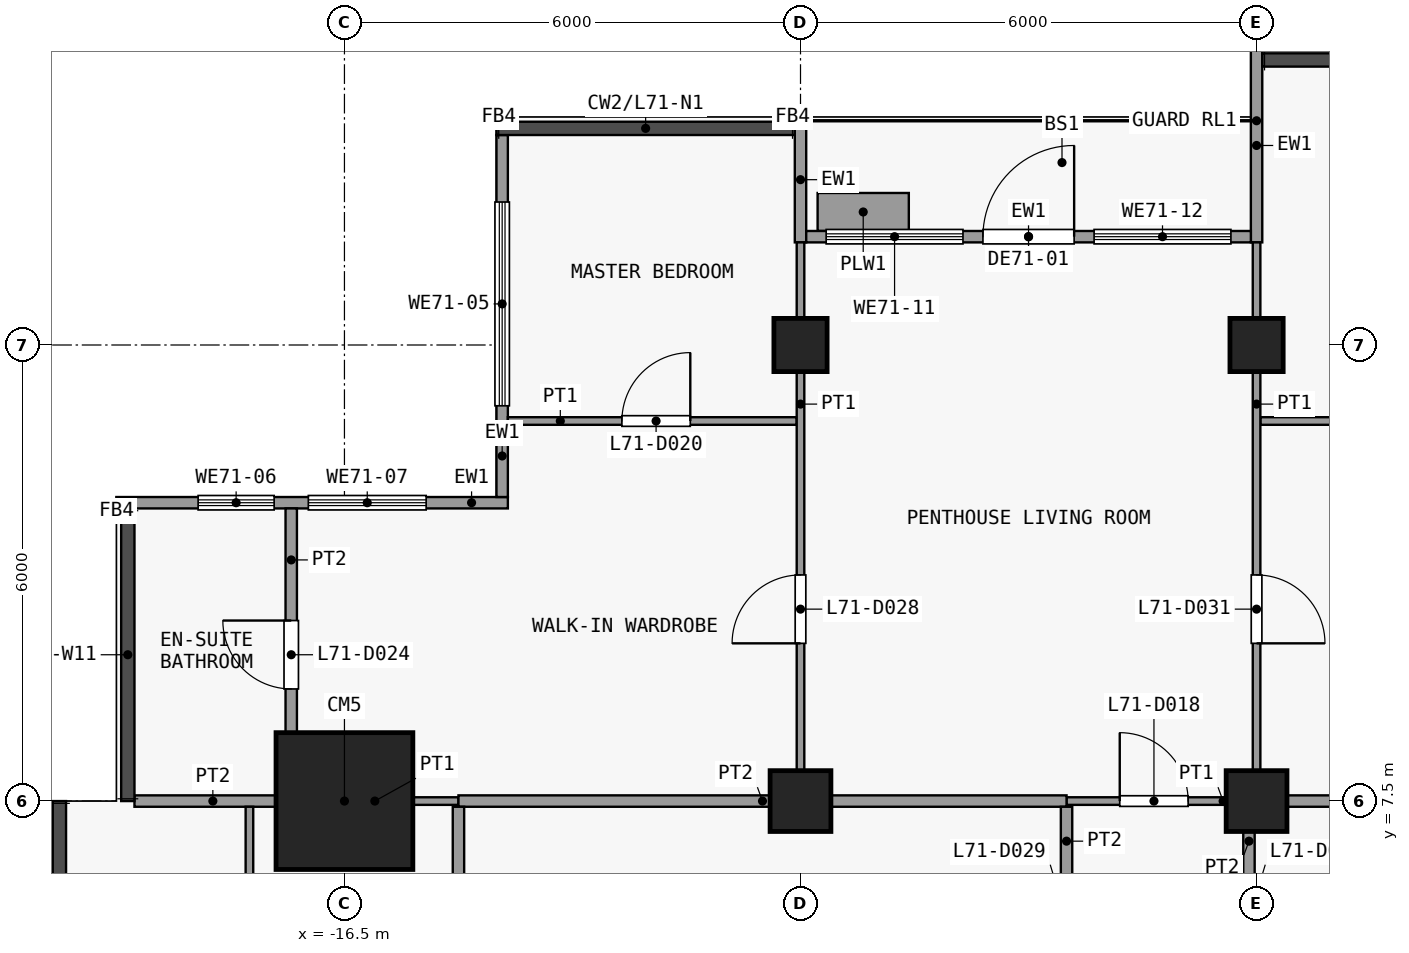
"""IFC4 building model, lengths in metres.
Left out: names, types, materials, properties, quantities, classifications, styles, units other than length and angle.
Written with IfcOpenShell. Run it as: python <this file> out.ifc"""

import sys

from ifc_helpers import new_model, si_unit, direction, frame, frame_2d, origin, origin_2d, place, context, subcontext, project, spatial, rectangle, extrude, element, fill, save


model = new_model("IFC4")
c1 = context("Model", 3, precision=1e-05, world=origin(), true_north=direction((0.0, 1.0)))
c2 = subcontext(c1, "Body", "Model", "MODEL_VIEW")
j1 = project(units=[si_unit("LENGTHUNIT", "METRE"), si_unit("PLANEANGLEUNIT", "RADIAN")], contexts=[c1])
p1 = place(None, origin())
s1 = spatial("IfcSite", under=j1, at=p1, CompositionType="ELEMENT")
p2 = place(p1, origin())
s2 = spatial("IfcBuilding", under=s1, at=p2, CompositionType="ELEMENT")
p3 = place(p2, frame((0.0, 0.0, 280.7)))
s3 = spatial("IfcBuildingStorey", under=s2, at=p3, CompositionType="ELEMENT", Elevation=280.7)
p4 = place(p3, frame((-16.5, 7.5, 0.0), z_axis=(0.0, 0.0, 1.0), x_axis=(1.0, 0.0, 0.0)))
e1 = element("IfcColumn", 1, at=p4, inside=s3, PredefinedType="COLUMN", context=c2, shape_type="SweptSolid", body=[
    extrude(rectangle(XDim=1.8, YDim=1.8, at=origin_2d()), origin(), (0.0, 0.0, 1.0), 3.6),
])
p5 = place(p3, frame((-10.5, 7.5, 0.0), z_axis=(0.0, 0.0, 1.0), x_axis=(1.0, 0.0, 0.0)))
e2 = element("IfcColumn", 2, at=p5, inside=s3, PredefinedType="COLUMN", context=c2, shape_type="SweptSolid", body=[
    extrude(rectangle(XDim=0.8, YDim=0.8, at=origin_2d()), origin(), (0.0, 0.0, 1.0), 3.6),
])
p6 = place(p3, frame((-10.5, 13.5, 0.0), z_axis=(0.0, 0.0, 1.0), x_axis=(1.0, 0.0, 0.0)))
e3 = element("IfcColumn", 3, at=p6, inside=s3, PredefinedType="COLUMN", context=c2, shape_type="SweptSolid", body=[
    extrude(rectangle(XDim=0.7, YDim=0.7, at=origin_2d()), origin(), (0.0, 0.0, 1.0), 3.6),
])
p7 = place(p3, frame((-4.5, 7.5, 0.0), z_axis=(0.0, 0.0, 1.0), x_axis=(1.0, 0.0, 0.0)))
e4 = element("IfcColumn", 4, at=p7, inside=s3, PredefinedType="COLUMN", context=c2, shape_type="SweptSolid", body=[
    extrude(rectangle(XDim=0.8, YDim=0.8, at=origin_2d()), origin(), (0.0, 0.0, 1.0), 3.6),
])
p8 = place(p3, frame((-4.5, 13.5, 0.0), z_axis=(0.0, 0.0, 1.0), x_axis=(1.0, 0.0, 0.0)))
e5 = element("IfcColumn", 5, at=p8, inside=s3, PredefinedType="COLUMN", context=c2, shape_type="SweptSolid", body=[
    extrude(rectangle(XDim=0.7, YDim=0.7, at=origin_2d()), origin(), (0.0, 0.0, 1.0), 3.6),
])
p9 = place(p3, frame((-14.425, 11.5, 0.0), z_axis=(0.0, 0.0, 1.0), x_axis=(0.0, 1.0, 0.0)))
e6 = element("IfcWall", 6, at=p9, inside=s3, PredefinedType="SOLIDWALL", context=c2, shape_type="SweptSolid", body=[
    extrude(rectangle(XDim=4.762, YDim=0.15, at=frame_2d((2.381, 0.0))), origin(), (0.0, 0.0, 1.0), 3.3),
])
p10 = place(p9, frame((1.2, 0.0, 0.9)))
e7 = element("IfcOpeningElement", 7, at=p10, cuts=e6, PredefinedType="OPENING", context=c2, shape_type="SweptSolid", body=[
    extrude(rectangle(XDim=2.681, YDim=2.4, at=frame_2d((1.34, 1.2))), frame((0.0, 0.085, 0.0), z_axis=(0.0, -1.0, 0.0), x_axis=(1.0, 0.0, 0.0)), (0.0, 0.0, 1.0), 0.17),
])
p11 = place(p3, frame((-19.5, 11.425, 0.0), z_axis=(0.0, 0.0, 1.0), x_axis=(1.0, 0.0, 0.0)))
e8 = element("IfcWall", 8, at=p11, inside=s3, PredefinedType="SOLIDWALL", context=c2, shape_type="SweptSolid", body=[
    extrude(rectangle(XDim=5.15, YDim=0.15, at=frame_2d((2.575, 0.0))), origin(), (0.0, 0.0, 1.0), 3.3),
])
p12 = place(p11, frame((1.075, 0.0, 0.9)))
e9 = element("IfcOpeningElement", 9, at=p12, cuts=e8, PredefinedType="OPENING", context=c2, shape_type="SweptSolid", body=[
    extrude(rectangle(XDim=1.0, YDim=2.4, at=frame_2d((0.5, 1.2))), frame((0.0, 0.085, 0.0), z_axis=(0.0, -1.0, 0.0), x_axis=(1.0, 0.0, 0.0)), (0.0, 0.0, 1.0), 0.17),
])
p13 = place(p11, frame((2.525, 0.0, 0.9)))
e10 = element("IfcOpeningElement", 10, at=p13, cuts=e8, PredefinedType="OPENING", context=c2, shape_type="SweptSolid", body=[
    extrude(rectangle(XDim=1.55, YDim=2.4, at=frame_2d((0.775, 1.2))), frame((0.0, 0.085, 0.0), z_axis=(0.0, -1.0, 0.0), x_axis=(1.0, 0.0, 0.0)), (0.0, 0.0, 1.0), 0.17),
])
p14 = place(p3, frame((-10.5, 14.85, 0.0), z_axis=(0.0, 0.0, 1.0), x_axis=(0.0, 1.0, 0.0)))
e11 = element("IfcWall", 11, at=p14, inside=s3, PredefinedType="SOLIDWALL", context=c2, shape_type="SweptSolid", body=[
    extrude(rectangle(XDim=1.65, YDim=0.15, at=frame_2d((0.825, 0.0))), origin(), (0.0, 0.0, 1.0), 3.3),
])
p15 = place(p3, frame((-4.5, 14.85, 0.0), z_axis=(0.0, 0.0, 1.0), x_axis=(0.0, 1.0, 0.0)))
e12 = element("IfcWall", 12, at=p15, inside=s3, PredefinedType="SOLIDWALL", context=c2, shape_type="SweptSolid", body=[
    extrude(rectangle(XDim=2.55, YDim=0.15, at=frame_2d((1.275, 0.0))), origin(), (0.0, 0.0, 1.0), 3.3),
])
p16 = place(p3, frame((-10.425, 14.925, 0.0), z_axis=(0.0, 0.0, 1.0), x_axis=(1.0, 0.0, 0.0)))
e13 = element("IfcWall", 13, at=p16, inside=s3, PredefinedType="SOLIDWALL", context=c2, shape_type="SweptSolid", body=[
    extrude(rectangle(XDim=5.85, YDim=0.15, at=frame_2d((2.925, 0.0))), origin(), (0.0, 0.0, 1.0), 3.3),
])
p17 = place(p16, frame((2.325, 0.0, 0.0)))
e14 = element("IfcOpeningElement", 14, at=p17, cuts=e13, PredefinedType="OPENING", context=c2, shape_type="SweptSolid", body=[
    extrude(rectangle(XDim=1.2, YDim=2.4, at=frame_2d((0.6, 1.2))), frame((0.0, 0.085, 0.0), z_axis=(0.0, -1.0, 0.0), x_axis=(1.0, 0.0, 0.0)), (0.0, 0.0, 1.0), 0.17),
])
p18 = place(p16, frame((0.262, 0.0, 0.9)))
e15 = element("IfcOpeningElement", 15, at=p18, cuts=e13, PredefinedType="OPENING", context=c2, shape_type="SweptSolid", body=[
    extrude(rectangle(XDim=1.8, YDim=2.1, at=frame_2d((0.9, 1.05))), frame((0.0, 0.085, 0.0), z_axis=(0.0, -1.0, 0.0), x_axis=(1.0, 0.0, 0.0)), (0.0, 0.0, 1.0), 0.17),
])
p19 = place(p16, frame((3.788, 0.0, 0.9)))
e16 = element("IfcOpeningElement", 16, at=p19, cuts=e13, PredefinedType="OPENING", context=c2, shape_type="SweptSolid", body=[
    extrude(rectangle(XDim=1.8, YDim=2.1, at=frame_2d((0.9, 1.05))), frame((0.0, 0.085, 0.0), z_axis=(0.0, -1.0, 0.0), x_axis=(1.0, 0.0, 0.0)), (0.0, 0.0, 1.0), 0.17),
])
p20 = place(p3, frame((-10.275, 15.25, 0.0), z_axis=(0.0, 0.0, 1.0), x_axis=(1.0, 0.0, 0.0)))
e17 = element("IfcWall", 17, at=p20, inside=s3, PredefinedType="USERDEFINED", context=c2, shape_type="SweptSolid", body=[
    extrude(rectangle(XDim=1.2, YDim=0.5, at=frame_2d((0.6, 0.0))), origin(), (0.0, 0.0, 1.0), 0.9),
])
p21 = place(p3, frame((-17.2, 7.5, 0.0), z_axis=(0.0, 0.0, 1.0), x_axis=(1.0, 0.0, 0.0)))
e18 = element("IfcWall", 18, at=p21, inside=s3, PredefinedType="PARTITIONING", context=c2, shape_type="SweptSolid", body=[
    extrude(rectangle(XDim=2.2, YDim=0.1, at=frame_2d((1.1, 0.0))), origin(), (0.0, 0.0, 1.0), 3.3),
])
p22 = place(p3, frame((-7.0, 7.5, 0.0), z_axis=(0.0, 0.0, 1.0), x_axis=(1.0, 0.0, 0.0)))
e19 = element("IfcWall", 19, at=p22, inside=s3, PredefinedType="PARTITIONING", context=c2, shape_type="SweptSolid", body=[
    extrude(rectangle(XDim=2.4, YDim=0.1, at=frame_2d((1.2, 0.0))), origin(), (0.0, 0.0, 1.0), 3.3),
])
p23 = place(p22, frame((0.7, 0.0, 0.0)))
e20 = element("IfcOpeningElement", 20, at=p23, cuts=e19, PredefinedType="OPENING", context=c2, shape_type="SweptSolid", body=[
    extrude(rectangle(XDim=0.9, YDim=2.1, at=frame_2d((0.45, 1.05))), frame((0.0, 0.06, 0.0), z_axis=(0.0, -1.0, 0.0), x_axis=(1.0, 0.0, 0.0)), (0.0, 0.0, 1.0), 0.12),
])
p24 = place(p3, frame((-19.262, 7.5, 0.0), z_axis=(0.0, 0.0, 1.0), x_axis=(1.0, 0.0, 0.0)))
e21 = element("IfcWall", 21, at=p24, inside=s3, PredefinedType="PARTITIONING", context=c2, shape_type="SweptSolid", body=[
    extrude(rectangle(XDim=2.062, YDim=0.15, at=frame_2d((1.031, 0.0))), origin(), (0.0, 0.0, 1.0), 3.3),
])
p25 = place(p3, frame((-15.0, 7.5, 0.0), z_axis=(0.0, 0.0, 1.0), x_axis=(1.0, 0.0, 0.0)))
e22 = element("IfcWall", 22, at=p25, inside=s3, PredefinedType="PARTITIONING", context=c2, shape_type="SweptSolid", body=[
    extrude(rectangle(XDim=8.0, YDim=0.15, at=frame_2d((4.0, 0.0))), origin(), (0.0, 0.0, 1.0), 3.3),
])
p26 = place(p3, frame((-4.5, 7.5, 0.0), z_axis=(0.0, 0.0, 1.0), x_axis=(1.0, 0.0, 0.0)))
e23 = element("IfcWall", 23, at=p26, inside=s3, PredefinedType="PARTITIONING", context=c2, shape_type="SweptSolid", body=[
    extrude(rectangle(XDim=11.5, YDim=0.15, at=frame_2d((5.75, 0.0))), origin(), (0.0, 0.0, 1.0), 3.3),
])
p27 = place(p3, frame((-14.35, 12.5, 0.0), z_axis=(0.0, 0.0, 1.0), x_axis=(1.0, 0.0, 0.0)))
e24 = element("IfcWall", 24, at=p27, inside=s3, PredefinedType="PARTITIONING", context=c2, shape_type="SweptSolid", body=[
    extrude(rectangle(XDim=3.8, YDim=0.1, at=frame_2d((1.9, 0.0))), origin(), (0.0, 0.0, 1.0), 3.3),
])
p28 = place(p27, frame((1.5, 0.0, 0.0)))
e25 = element("IfcOpeningElement", 25, at=p28, cuts=e24, PredefinedType="OPENING", context=c2, shape_type="SweptSolid", body=[
    extrude(rectangle(XDim=0.9, YDim=2.1, at=frame_2d((0.45, 1.05))), frame((0.0, 0.06, 0.0), z_axis=(0.0, -1.0, 0.0), x_axis=(1.0, 0.0, 0.0)), (0.0, 0.0, 1.0), 0.12),
])
p29 = place(p3, frame((-4.45, 12.5, 0.0), z_axis=(0.0, 0.0, 1.0), x_axis=(1.0, 0.0, 0.0)))
e26 = element("IfcWall", 26, at=p29, inside=s3, PredefinedType="PARTITIONING", context=c2, shape_type="SweptSolid", body=[
    extrude(rectangle(XDim=8.85, YDim=0.1, at=frame_2d((4.425, 0.0))), origin(), (0.0, 0.0, 1.0), 3.3),
])
p30 = place(p29, frame((4.0, 0.0, 0.0)))
e27 = element("IfcOpeningElement", 27, at=p30, cuts=e26, PredefinedType="OPENING", context=c2, shape_type="SweptSolid", body=[
    extrude(rectangle(XDim=0.9, YDim=2.1, at=frame_2d((0.45, 1.05))), frame((0.0, 0.06, 0.0), z_axis=(0.0, -1.0, 0.0), x_axis=(1.0, 0.0, 0.0)), (0.0, 0.0, 1.0), 0.12),
])
p31 = place(p3, frame((-17.75, 4.6, 0.0), z_axis=(0.0, 0.0, 1.0), x_axis=(0.0, 1.0, 0.0)))
e28 = element("IfcWall", 28, at=p31, inside=s3, PredefinedType="PARTITIONING", context=c2, shape_type="SweptSolid", body=[
    extrude(rectangle(XDim=2.825, YDim=0.1, at=frame_2d((1.413, 0.0))), origin(), (0.0, 0.0, 1.0), 3.3),
])
p32 = place(p31, frame((1.0, 0.0, 0.0)))
e29 = element("IfcOpeningElement", 29, at=p32, cuts=e28, PredefinedType="OPENING", context=c2, shape_type="SweptSolid", body=[
    extrude(rectangle(XDim=0.9, YDim=2.1, at=frame_2d((0.45, 1.05))), frame((0.0, 0.06, 0.0), z_axis=(0.0, -1.0, 0.0), x_axis=(1.0, 0.0, 0.0)), (0.0, 0.0, 1.0), 0.12),
])
p33 = place(p3, frame((-17.2, 7.575, 0.0), z_axis=(0.0, 0.0, 1.0), x_axis=(0.0, 1.0, 0.0)))
e30 = element("IfcWall", 30, at=p33, inside=s3, PredefinedType="PARTITIONING", context=c2, shape_type="SweptSolid", body=[
    extrude(rectangle(XDim=3.775, YDim=0.15, at=frame_2d((1.888, 0.0))), origin(), (0.0, 0.0, 1.0), 3.3),
])
p34 = place(p33, frame((1.4, 0.0, 0.0)))
e31 = element("IfcOpeningElement", 31, at=p34, cuts=e30, PredefinedType="OPENING", context=c2, shape_type="SweptSolid", body=[
    extrude(rectangle(XDim=0.9, YDim=2.1, at=frame_2d((0.45, 1.05))), frame((0.0, 0.085, 0.0), z_axis=(0.0, -1.0, 0.0), x_axis=(1.0, 0.0, 0.0)), (0.0, 0.0, 1.0), 0.17),
])
p35 = place(p3, frame((-15.0, 4.6, 0.0), z_axis=(0.0, 0.0, 1.0), x_axis=(0.0, 1.0, 0.0)))
e32 = element("IfcWall", 32, at=p35, inside=s3, PredefinedType="PARTITIONING", context=c2, shape_type="SweptSolid", body=[
    extrude(rectangle(XDim=2.825, YDim=0.15, at=frame_2d((1.413, 0.0))), origin(), (0.0, 0.0, 1.0), 3.3),
])
p36 = place(p35, frame((1.0, 0.0, 0.0)))
e33 = element("IfcOpeningElement", 33, at=p36, cuts=e32, PredefinedType="OPENING", context=c2, shape_type="SweptSolid", body=[
    extrude(rectangle(XDim=0.9, YDim=2.1, at=frame_2d((0.45, 1.05))), frame((0.0, 0.085, 0.0), z_axis=(0.0, -1.0, 0.0), x_axis=(1.0, 0.0, 0.0)), (0.0, 0.0, 1.0), 0.17),
])
p37 = place(p3, frame((-10.5, 7.575, 0.0), z_axis=(0.0, 0.0, 1.0), x_axis=(0.0, 1.0, 0.0)))
e34 = element("IfcWall", 34, at=p37, inside=s3, PredefinedType="PARTITIONING", context=c2, shape_type="SweptSolid", body=[
    extrude(rectangle(XDim=7.275, YDim=0.1, at=frame_2d((3.638, 0.0))), origin(), (0.0, 0.0, 1.0), 3.3),
])
p38 = place(p37, frame((2.0, 0.0, 0.0)))
e35 = element("IfcOpeningElement", 35, at=p38, cuts=e34, PredefinedType="OPENING", context=c2, shape_type="SweptSolid", body=[
    extrude(rectangle(XDim=0.9, YDim=2.1, at=frame_2d((0.45, 1.05))), frame((0.0, 0.06, 0.0), z_axis=(0.0, -1.0, 0.0), x_axis=(1.0, 0.0, 0.0)), (0.0, 0.0, 1.0), 0.12),
])
p39 = place(p3, frame((-7.0, 4.6, 0.0), z_axis=(0.0, 0.0, 1.0), x_axis=(0.0, 1.0, 0.0)))
e36 = element("IfcWall", 36, at=p39, inside=s3, PredefinedType="PARTITIONING", context=c2, shape_type="SweptSolid", body=[
    extrude(rectangle(XDim=2.825, YDim=0.15, at=frame_2d((1.413, 0.0))), origin(), (0.0, 0.0, 1.0), 3.3),
])
p40 = place(p39, frame((0.9, 0.0, 0.0)))
e37 = element("IfcOpeningElement", 37, at=p40, cuts=e36, PredefinedType="OPENING", context=c2, shape_type="SweptSolid", body=[
    extrude(rectangle(XDim=0.9, YDim=2.1, at=frame_2d((0.45, 1.05))), frame((0.0, 0.085, 0.0), z_axis=(0.0, -1.0, 0.0), x_axis=(1.0, 0.0, 0.0)), (0.0, 0.0, 1.0), 0.17),
])
p41 = place(p3, frame((-4.6, 4.6, 0.0), z_axis=(0.0, 0.0, 1.0), x_axis=(0.0, 1.0, 0.0)))
e38 = element("IfcWall", 38, at=p41, inside=s3, PredefinedType="PARTITIONING", context=c2, shape_type="SweptSolid", body=[
    extrude(rectangle(XDim=2.825, YDim=0.15, at=frame_2d((1.413, 0.0))), origin(), (0.0, 0.0, 1.0), 3.3),
])
p42 = place(p41, frame((0.9, 0.0, 0.0)))
e39 = element("IfcOpeningElement", 39, at=p42, cuts=e38, PredefinedType="OPENING", context=c2, shape_type="SweptSolid", body=[
    extrude(rectangle(XDim=0.9, YDim=2.1, at=frame_2d((0.45, 1.05))), frame((0.0, 0.085, 0.0), z_axis=(0.0, -1.0, 0.0), x_axis=(1.0, 0.0, 0.0)), (0.0, 0.0, 1.0), 0.17),
])
p43 = place(p3, frame((-4.5, 7.575, 0.0), z_axis=(0.0, 0.0, 1.0), x_axis=(0.0, 1.0, 0.0)))
e40 = element("IfcWall", 40, at=p43, inside=s3, PredefinedType="PARTITIONING", context=c2, shape_type="SweptSolid", body=[
    extrude(rectangle(XDim=7.275, YDim=0.1, at=frame_2d((3.638, 0.0))), origin(), (0.0, 0.0, 1.0), 3.3),
])
p44 = place(p43, frame((2.0, 0.0, 0.0)))
e41 = element("IfcOpeningElement", 41, at=p44, cuts=e40, PredefinedType="OPENING", context=c2, shape_type="SweptSolid", body=[
    extrude(rectangle(XDim=0.9, YDim=2.1, at=frame_2d((0.45, 1.05))), frame((0.0, 0.06, 0.0), z_axis=(0.0, -1.0, 0.0), x_axis=(1.0, 0.0, 0.0)), (0.0, 0.0, 1.0), 0.12),
])
p45 = place(p10, origin())
e42 = element("IfcWindow", 42, at=p45, inside=s3, PartitioningType="SINGLE_PANEL", PredefinedType="WINDOW", context=c2, shape_type="SweptSolid", body=[
    extrude(rectangle(XDim=2.681, YDim=2.4, at=frame_2d((1.34, 1.2))), frame((0.0, 0.03, 0.0), z_axis=(0.0, -1.0, 0.0), x_axis=(1.0, 0.0, 0.0)), (0.0, 0.0, 1.0), 0.06),
])
fill(e7, e42)
p46 = place(p12, origin())
e43 = element("IfcWindow", 43, at=p46, inside=s3, PartitioningType="SINGLE_PANEL", PredefinedType="WINDOW", context=c2, shape_type="SweptSolid", body=[
    extrude(rectangle(XDim=1.0, YDim=2.4, at=frame_2d((0.5, 1.2))), frame((0.0, 0.03, 0.0), z_axis=(0.0, -1.0, 0.0), x_axis=(1.0, 0.0, 0.0)), (0.0, 0.0, 1.0), 0.06),
])
fill(e9, e43)
p47 = place(p13, origin())
e44 = element("IfcWindow", 44, at=p47, inside=s3, PartitioningType="SINGLE_PANEL", PredefinedType="WINDOW", context=c2, shape_type="SweptSolid", body=[
    extrude(rectangle(XDim=1.55, YDim=2.4, at=frame_2d((0.775, 1.2))), frame((0.0, 0.03, 0.0), z_axis=(0.0, -1.0, 0.0), x_axis=(1.0, 0.0, 0.0)), (0.0, 0.0, 1.0), 0.06),
])
fill(e10, e44)
p48 = place(p17, origin())
e45 = element("IfcDoor", 45, at=p48, inside=s3, OperationType="SINGLE_SWING_RIGHT", PredefinedType="DOOR", context=c2, shape_type="SweptSolid", body=[
    extrude(rectangle(XDim=1.2, YDim=2.4, at=frame_2d((0.6, 1.2))), frame((0.0, 0.025, 0.0), z_axis=(0.0, -1.0, 0.0), x_axis=(1.0, 0.0, 0.0)), (0.0, 0.0, 1.0), 0.05),
])
fill(e14, e45)
p49 = place(p18, origin())
e46 = element("IfcWindow", 46, at=p49, inside=s3, PartitioningType="SINGLE_PANEL", PredefinedType="WINDOW", context=c2, shape_type="SweptSolid", body=[
    extrude(rectangle(XDim=1.8, YDim=2.1, at=frame_2d((0.9, 1.05))), frame((0.0, 0.03, 0.0), z_axis=(0.0, -1.0, 0.0), x_axis=(1.0, 0.0, 0.0)), (0.0, 0.0, 1.0), 0.06),
])
fill(e15, e46)
p50 = place(p19, origin())
e47 = element("IfcWindow", 47, at=p50, inside=s3, PartitioningType="SINGLE_PANEL", PredefinedType="WINDOW", context=c2, shape_type="SweptSolid", body=[
    extrude(rectangle(XDim=1.8, YDim=2.1, at=frame_2d((0.9, 1.05))), frame((0.0, 0.03, 0.0), z_axis=(0.0, -1.0, 0.0), x_axis=(1.0, 0.0, 0.0)), (0.0, 0.0, 1.0), 0.06),
])
fill(e16, e47)
p51 = place(p23, origin())
e48 = element("IfcDoor", 48, at=p51, inside=s3, OperationType="SINGLE_SWING_RIGHT", PredefinedType="DOOR", context=c2, shape_type="SweptSolid", body=[
    extrude(rectangle(XDim=0.9, YDim=2.1, at=frame_2d((0.45, 1.05))), frame((0.0, 0.025, 0.0), z_axis=(0.0, -1.0, 0.0), x_axis=(1.0, 0.0, 0.0)), (0.0, 0.0, 1.0), 0.05),
])
fill(e20, e48)
p52 = place(p28, origin())
e49 = element("IfcDoor", 49, at=p52, inside=s3, OperationType="SINGLE_SWING_LEFT", PredefinedType="DOOR", context=c2, shape_type="SweptSolid", body=[
    extrude(rectangle(XDim=0.9, YDim=2.1, at=frame_2d((0.45, 1.05))), frame((0.0, 0.025, 0.0), z_axis=(0.0, -1.0, 0.0), x_axis=(1.0, 0.0, 0.0)), (0.0, 0.0, 1.0), 0.05),
])
fill(e25, e49)
p53 = place(p34, origin())
e50 = element("IfcDoor", 50, at=p53, inside=s3, OperationType="SINGLE_SWING_LEFT", PredefinedType="DOOR", context=c2, shape_type="SweptSolid", body=[
    extrude(rectangle(XDim=0.9, YDim=2.1, at=frame_2d((0.45, 1.05))), frame((0.0, 0.025, 0.0), z_axis=(0.0, -1.0, 0.0), x_axis=(1.0, 0.0, 0.0)), (0.0, 0.0, 1.0), 0.05),
])
fill(e31, e50)
p54 = place(p38, origin())
e51 = element("IfcDoor", 51, at=p54, inside=s3, OperationType="SINGLE_SWING_RIGHT", PredefinedType="DOOR", context=c2, shape_type="SweptSolid", body=[
    extrude(rectangle(XDim=0.9, YDim=2.1, at=frame_2d((0.45, 1.05))), frame((0.0, 0.025, 0.0), z_axis=(0.0, -1.0, 0.0), x_axis=(1.0, 0.0, 0.0)), (0.0, 0.0, 1.0), 0.05),
])
fill(e35, e51)
p55 = place(p44, origin())
e52 = element("IfcDoor", 52, at=p55, inside=s3, OperationType="SINGLE_SWING_LEFT", PredefinedType="DOOR", context=c2, shape_type="SweptSolid", body=[
    extrude(rectangle(XDim=0.9, YDim=2.1, at=frame_2d((0.45, 1.05))), frame((0.0, 0.025, 0.0), z_axis=(0.0, -1.0, 0.0), x_axis=(1.0, 0.0, 0.0)), (0.0, 0.0, 1.0), 0.05),
])
fill(e41, e52)
save(model, sys.argv[1])
